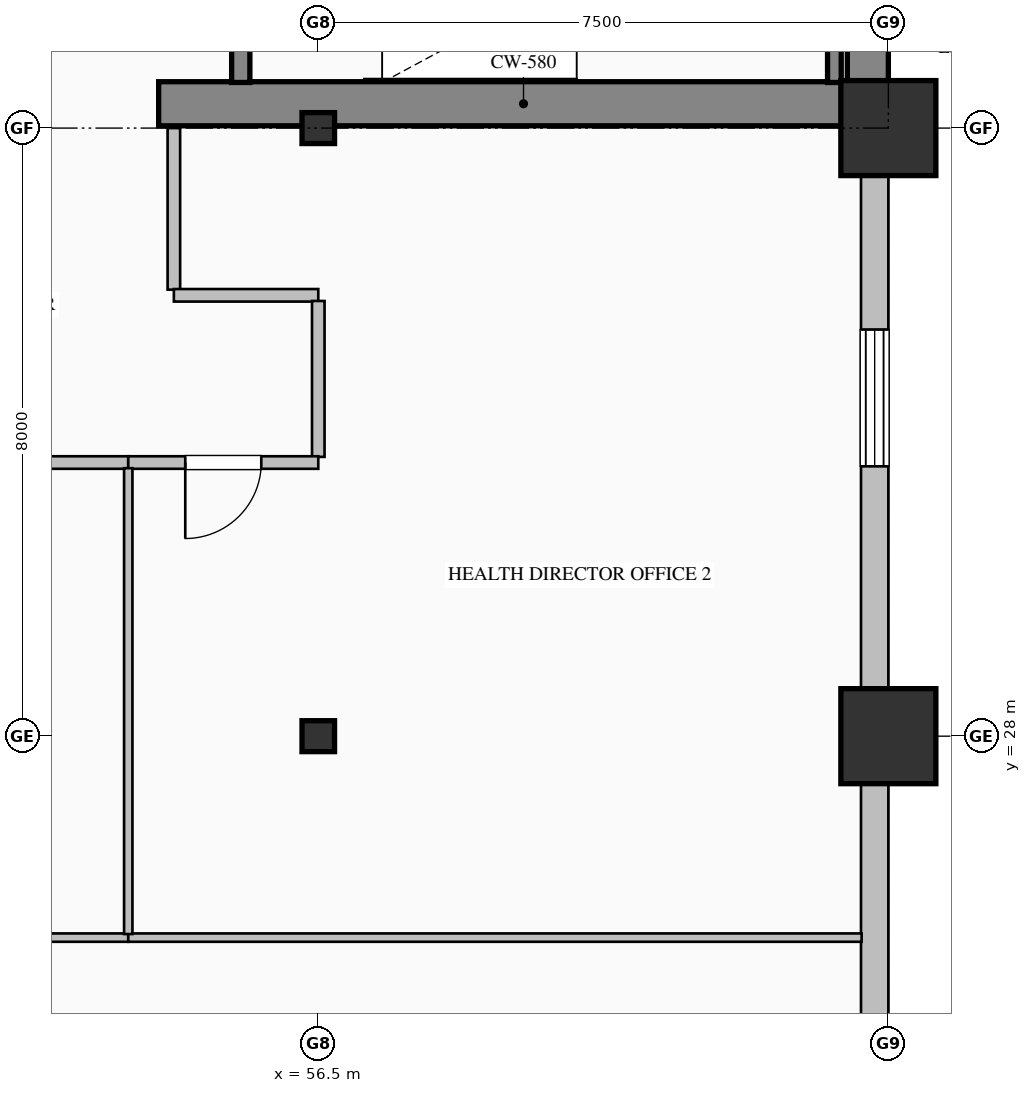
"""IFC4 building model, lengths in metres.
Left out: names, types, materials, properties, quantities, classifications, styles, units other than length and angle.
Written with IfcOpenShell. Run it as: python <this file> out.ifc"""

import sys

from ifc_helpers import new_model, si_unit, direction, frame, frame_2d, origin, origin_2d, place, context, subcontext, project, spatial, rectangle, hollow_rectangle, i_section, extrude, element, fill, save


model = new_model("IFC4")
c1 = context("Model", 3, precision=1e-05, world=origin(), true_north=direction((0.0, 1.0)))
c2 = subcontext(c1, "Body", "Model", "MODEL_VIEW")
j1 = project(units=[si_unit("LENGTHUNIT", "METRE"), si_unit("PLANEANGLEUNIT", "RADIAN")], contexts=[c1])
p1 = place(None, origin())
s1 = spatial("IfcSite", under=j1, at=p1, CompositionType="ELEMENT")
p2 = place(p1, origin())
s2 = spatial("IfcBuilding", under=s1, at=p2, CompositionType="ELEMENT")
p3 = place(p2, frame((0.0, 0.0, 88.2)))
s3 = spatial("IfcBuildingStorey", under=s2, at=p3, CompositionType="ELEMENT", Elevation=88.2)
p4 = place(p3, frame((63.73, 36.32, 0.0), z_axis=(0.0, 0.0, 1.0), x_axis=(0.0, 1.0, 0.0)))
e1 = element("IfcWall", 1, at=p4, inside=s3, PredefinedType="SHEAR", context=c2, shape_type="SweptSolid", body=[
    extrude(rectangle(XDim=15.14, YDim=0.54, at=frame_2d((7.57, 0.0))), origin(), (0.0, 0.0, 1.0), 3.75),
])
p5 = place(p3, frame((54.4, 36.32, 0.0), z_axis=(0.0, 0.0, 1.0), x_axis=(1.0, 0.0, 0.0)))
e2 = element("IfcWall", 2, at=p5, inside=s3, PredefinedType="SHEAR", context=c2, shape_type="SweptSolid", body=[
    extrude(rectangle(XDim=9.6, YDim=0.58, at=frame_2d((4.8, 0.0))), origin(), (0.0, 0.0, 1.0), 4.0),
])
for number, where, z_axis, x_axis in (
    (3, (56.5, 28.0, 0.0), (0.0, 0.0, 1.0), (1.0, 0.0, 0.0)),
    (4, (56.5, 36.0, 0.0), (0.0, 0.0, 1.0), (1.0, 0.0, 0.0)),
):
    element("IfcColumn", number, at=place(p3, frame(where, z_axis=z_axis, x_axis=x_axis)), inside=s3, PredefinedType="COLUMN", context=c2, shape_type="SweptSolid", body=[
        extrude(i_section(OverallWidth=0.407, OverallDepth=0.428, WebThickness=0.02, FlangeThickness=0.035, FilletRadius=0.022, at=origin_2d()), origin(), (0.0, 0.0, 1.0), 4.0),
    ])
for number, where, z_axis, x_axis in (
    (5, (64.0, 28.0, 0.0), (0.0, 0.0, 1.0), (1.0, 0.0, 0.0)),
    (6, (64.0, 36.0, 0.0), (0.0, 0.0, 1.0), (1.0, 0.0, 0.0)),
):
    element("IfcColumn", number, at=place(p3, frame(where, z_axis=z_axis, x_axis=x_axis)), inside=s3, PredefinedType="COLUMN", context=c2, shape_type="SweptSolid", body=[
        extrude(hollow_rectangle(XDim=1.25, YDim=1.25, WallThickness=0.045, at=origin_2d()), origin(), (0.0, 0.0, 1.0), 4.0),
    ])
p6 = place(p3, frame((63.82, 36.05, 0.0), z_axis=(0.0, 0.0, 1.0), x_axis=(0.0, -1.0, 0.0)))
e7 = element("IfcWall", 7, at=p6, inside=s3, PredefinedType="SOLIDWALL", context=c2, shape_type="SweptSolid", body=[
    extrude(rectangle(XDim=28.05, YDim=0.36, at=frame_2d((14.025, 0.0))), origin(), (0.0, 0.0, 1.0), 3.25),
])
p7 = place(p6, frame((2.7, 0.0, 0.85)))
e8 = element("IfcOpeningElement", 8, at=p7, cuts=e7, PredefinedType="OPENING", context=c2, shape_type="SweptSolid", body=[
    extrude(rectangle(XDim=1.8, YDim=2.05, at=frame_2d((0.9, 1.025))), frame((0.0, 0.19, 0.0), z_axis=(0.0, -1.0, 0.0), x_axis=(1.0, 0.0, 0.0)), (0.0, 0.0, 1.0), 0.38),
])
p8 = place(p6, frame((13.5, 0.0, 0.85)))
e9 = element("IfcOpeningElement", 9, at=p8, cuts=e7, PredefinedType="OPENING", context=c2, shape_type="SweptSolid", body=[
    extrude(rectangle(XDim=1.8, YDim=2.05, at=frame_2d((0.9, 1.025))), frame((0.0, 0.19, 0.0), z_axis=(0.0, -1.0, 0.0), x_axis=(1.0, 0.0, 0.0)), (0.0, 0.0, 1.0), 0.38),
])
p9 = place(p3, frame((55.48, 39.75, 0.0), z_axis=(0.0, 0.0, 1.0), x_axis=(0.0, -1.0, 0.0)))
e10 = element("IfcWall", 10, at=p9, inside=s3, PredefinedType="SOLIDWALL", context=c2, shape_type="SweptSolid", body=[
    extrude(rectangle(XDim=3.15, YDim=0.24, at=frame_2d((1.575, 0.0))), origin(), (0.0, 0.0, 1.0), 4.0),
])
p10 = place(p9, frame((1.0, 0.0, 0.0)))
e11 = element("IfcOpeningElement", 11, at=p10, cuts=e10, PredefinedType="OPENING", context=c2, shape_type="SweptSolid", body=[
    extrude(rectangle(XDim=1.15, YDim=2.2, at=frame_2d((0.575, 1.1))), frame((0.0, 0.13, 0.0), z_axis=(0.0, -1.0, 0.0), x_axis=(1.0, 0.0, 0.0)), (0.0, 0.0, 1.0), 0.26),
])
p11 = place(p3, frame((63.29, 36.6, 0.0), z_axis=(0.0, 0.0, 1.0), x_axis=(0.0, 1.0, 0.0)))
e12 = element("IfcWall", 12, at=p11, inside=s3, PredefinedType="SOLIDWALL", context=c2, shape_type="SweptSolid", body=[
    extrude(rectangle(XDim=3.15, YDim=0.18, at=frame_2d((1.575, 0.0))), origin(), (0.0, 0.0, 1.0), 4.0),
])
p12 = place(p3, frame((54.0, 31.6, 0.0), z_axis=(0.0, 0.0, 1.0), x_axis=(-1.0, 0.0, 0.0)))
e13 = element("IfcWall", 13, at=p12, inside=s3, PredefinedType="PARTITIONING", context=c2, shape_type="SweptSolid", body=[
    extrude(rectangle(XDim=8.8, YDim=0.165, at=frame_2d((4.4, 0.0))), origin(), (0.0, 0.0, 1.0), 3.75),
])
p13 = place(p12, frame((3.9, 0.0, 0.0)))
e14 = element("IfcOpeningElement", 14, at=p13, cuts=e13, PredefinedType="OPENING", context=c2, shape_type="SweptSolid", body=[
    extrude(rectangle(XDim=1.0, YDim=2.15, at=frame_2d((0.5, 1.075))), frame((0.0, 0.093, 0.0), z_axis=(0.0, -1.0, 0.0), x_axis=(1.0, 0.0, 0.0)), (0.0, 0.0, 1.0), 0.185),
])
p14 = place(p3, frame((54.6, 36.0, 0.0), z_axis=(0.0, 0.0, 1.0), x_axis=(0.0, -1.0, 0.0)))
e15 = element("IfcWall", 15, at=p14, inside=s3, PredefinedType="PARTITIONING", context=c2, shape_type="SweptSolid", body=[
    extrude(rectangle(XDim=2.125, YDim=0.165, at=frame_2d((1.063, 0.0))), origin(), (0.0, 0.0, 1.0), 3.75),
])
p15 = place(p3, frame((54.6, 33.8, 0.0), z_axis=(0.0, 0.0, 1.0), x_axis=(1.0, 0.0, 0.0)))
e16 = element("IfcWall", 16, at=p15, inside=s3, PredefinedType="PARTITIONING", context=c2, shape_type="SweptSolid", body=[
    extrude(rectangle(XDim=1.9, YDim=0.165, at=frame_2d((0.95, 0.0))), origin(), (0.0, 0.0, 1.0), 3.75),
])
p16 = place(p3, frame((56.5, 33.726, 0.0), z_axis=(0.0, 0.0, 1.0), x_axis=(0.0, -1.0, 0.0)))
e17 = element("IfcWall", 17, at=p16, inside=s3, PredefinedType="PARTITIONING", context=c2, shape_type="SweptSolid", body=[
    extrude(rectangle(XDim=2.051, YDim=0.165, at=frame_2d((1.025, 0.0))), origin(), (0.0, 0.0, 1.0), 3.042),
])
p17 = place(p3, frame((56.5, 31.6, 0.0), z_axis=(0.0, 0.0, 1.0), x_axis=(-1.0, 0.0, 0.0)))
e18 = element("IfcWall", 18, at=p17, inside=s3, PredefinedType="PARTITIONING", context=c2, shape_type="SweptSolid", body=[
    extrude(rectangle(XDim=2.5, YDim=0.165, at=frame_2d((1.25, 0.0))), origin(), (0.0, 0.0, 1.0), 3.75),
])
p18 = place(p17, frame((0.75, 0.0, 0.0)))
e19 = element("IfcOpeningElement", 19, at=p18, cuts=e18, PredefinedType="OPENING", context=c2, shape_type="SweptSolid", body=[
    extrude(rectangle(XDim=1.0, YDim=2.15, at=frame_2d((0.5, 1.075))), frame((0.0, 0.093, 0.0), z_axis=(0.0, -1.0, 0.0), x_axis=(1.0, 0.0, 0.0)), (0.0, 0.0, 1.0), 0.185),
])
p19 = place(p3, frame((45.2, 25.35, 0.0), z_axis=(0.0, 0.0, 1.0), x_axis=(1.0, 0.0, 0.0)))
e20 = element("IfcWall", 20, at=p19, inside=s3, PredefinedType="MOVABLE", context=c2, shape_type="SweptSolid", body=[
    extrude(rectangle(XDim=8.8, YDim=0.11, at=frame_2d((4.4, 0.0))), origin(), (0.0, 0.0, 1.0), 3.75),
])
p20 = place(p3, frame((54.0, 25.35, 0.0), z_axis=(0.0, 0.0, 1.0), x_axis=(1.0, 0.0, 0.0)))
e21 = element("IfcWall", 21, at=p20, inside=s3, PredefinedType="MOVABLE", context=c2, shape_type="SweptSolid", body=[
    extrude(rectangle(XDim=9.648, YDim=0.11, at=frame_2d((4.824, 0.0))), origin(), (0.0, 0.0, 1.0), 3.75),
])
p21 = place(p3, frame((54.0, 31.525, 0.0), z_axis=(0.0, 0.0, 1.0), x_axis=(0.0, -1.0, 0.0)))
e22 = element("IfcWall", 22, at=p21, inside=s3, PredefinedType="MOVABLE", context=c2, shape_type="SweptSolid", body=[
    extrude(rectangle(XDim=6.128, YDim=0.11, at=frame_2d((3.064, 0.0))), origin(), (0.0, 0.0, 1.0), 3.75),
])
p22 = place(p7, origin())
e23 = element("IfcWindow", 23, at=p22, inside=s3, PartitioningType="TRIPLE_PANEL_VERTICAL", PredefinedType="WINDOW", context=c2, shape_type="SweptSolid", body=[
    extrude(rectangle(XDim=1.8, YDim=2.05, at=frame_2d((0.9, 1.025))), frame((0.0, 0.15, 0.0), z_axis=(0.0, -1.0, 0.0), x_axis=(1.0, 0.0, 0.0)), (0.0, 0.0, 1.0), 0.06),
])
fill(e8, e23)
p23 = place(p18, origin())
e24 = element("IfcDoor", 24, at=p23, inside=s3, OperationType="SINGLE_SWING_RIGHT", PredefinedType="DOOR", context=c2, shape_type="SweptSolid", body=[
    extrude(rectangle(XDim=1.0, YDim=2.15, at=frame_2d((0.5, 1.075))), frame((0.0, 0.025, 0.0), z_axis=(0.0, -1.0, 0.0), x_axis=(1.0, 0.0, 0.0)), (0.0, 0.0, 1.0), 0.05),
])
fill(e19, e24)
save(model, sys.argv[1])
